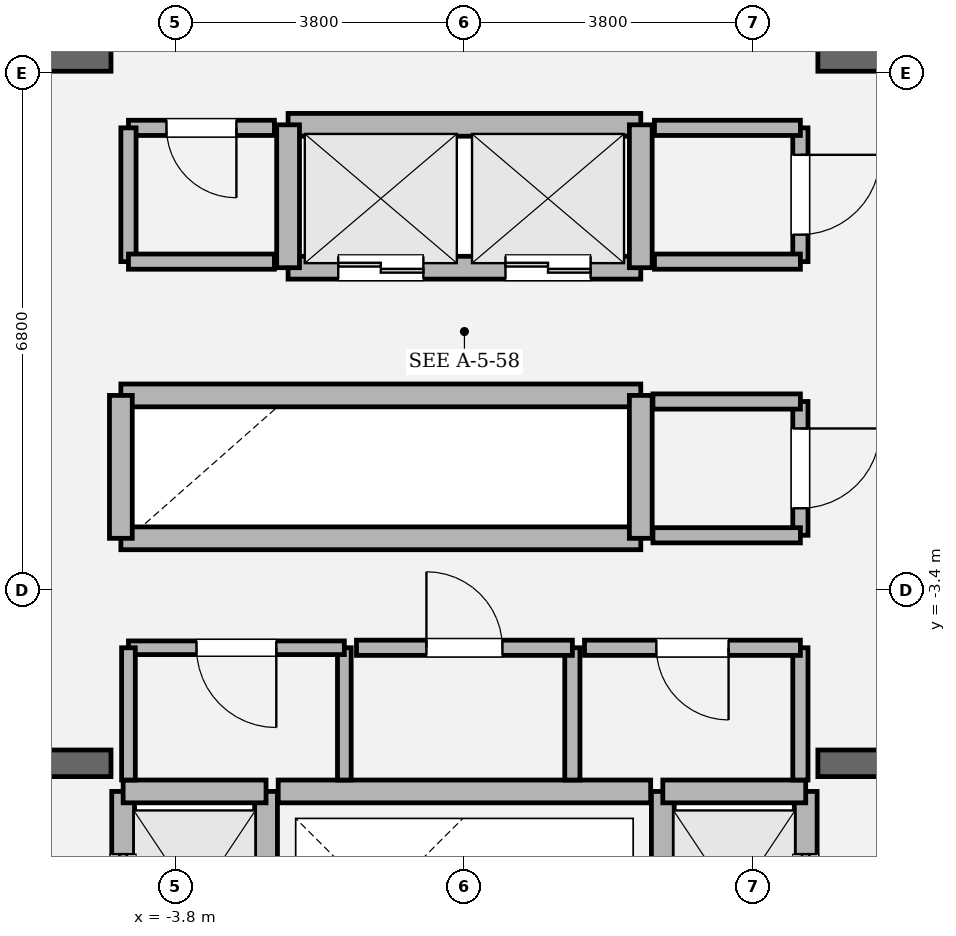
"""IFC4 building model, lengths in metres.
Left out: names, types, materials, properties, quantities, classifications, styles, units other than length and angle.
Written with IfcOpenShell. Run it as: python <this file> out.ifc"""

import sys

from ifc_helpers import new_model, si_unit, direction, frame, frame_2d, origin, place, context, subcontext, project, spatial, rectangle, extrude, element, fill, save


model = new_model("IFC4")
c1 = context("Model", 3, precision=1e-05, world=origin(), true_north=direction((0.0, 1.0)))
c2 = subcontext(c1, "Body", "Model", "MODEL_VIEW")
j1 = project(units=[si_unit("LENGTHUNIT", "METRE"), si_unit("PLANEANGLEUNIT", "RADIAN")], contexts=[c1])
p1 = place(None, origin())
s1 = spatial("IfcSite", under=j1, at=p1, CompositionType="ELEMENT")
p2 = place(p1, origin())
s2 = spatial("IfcBuilding", under=s1, at=p2, CompositionType="ELEMENT")
p3 = place(p2, frame((0.0, 0.0, 283.8)))
s3 = spatial("IfcBuildingStorey", under=s2, at=p3, CompositionType="ELEMENT", Elevation=283.8)
p4 = place(p3, frame((-9.925, -5.68, 0.0), z_axis=(0.0, 0.0, 1.0), x_axis=(1.0, 0.0, 0.0)))
e1 = element("IfcWall", 1, at=p4, inside=s3, PredefinedType="SOLIDWALL", context=c2, shape_type="SweptSolid", body=[
    extrude(rectangle(XDim=5.275, YDim=0.35, at=frame_2d((2.638, 0.0))), origin(), (0.0, 0.0, 1.0), 4.2),
])
p5 = place(p4, frame((1.385, 0.0, 0.0)))
e2 = element("IfcOpeningElement", 2, at=p5, cuts=e1, PredefinedType="OPENING", context=c2, shape_type="SweptSolid", body=[
    extrude(rectangle(XDim=1.18, YDim=2.2, at=frame_2d((0.59, 1.1))), frame((0.0, 0.185, 0.0), z_axis=(0.0, -1.0, 0.0), x_axis=(1.0, 0.0, 0.0)), (0.0, 0.0, 1.0), 0.37),
])
p6 = place(p3, frame((4.65, -5.68, 0.0), z_axis=(0.0, 0.0, 1.0), x_axis=(1.0, 0.0, 0.0)))
e3 = element("IfcWall", 3, at=p6, inside=s3, PredefinedType="SOLIDWALL", context=c2, shape_type="SweptSolid", body=[
    extrude(rectangle(XDim=5.275, YDim=0.35, at=frame_2d((2.638, 0.0))), origin(), (0.0, 0.0, 1.0), 4.2),
])
p7 = place(p6, frame((2.71, 0.0, 0.0)))
e4 = element("IfcOpeningElement", 4, at=p7, cuts=e3, PredefinedType="OPENING", context=c2, shape_type="SweptSolid", body=[
    extrude(rectangle(XDim=1.18, YDim=2.2, at=frame_2d((0.59, 1.1))), frame((0.0, 0.185, 0.0), z_axis=(0.0, -1.0, 0.0), x_axis=(1.0, 0.0, 0.0)), (0.0, 0.0, 1.0), 0.37),
])
for number, where, z_axis, x_axis in (
    (5, (-9.925, 3.6, 0.0), (0.0, 0.0, 1.0), (1.0, 0.0, 0.0)),
    (6, (4.65, 3.6, 0.0), (0.0, 0.0, 1.0), (1.0, 0.0, 0.0)),
):
    element("IfcWall", number, at=place(p3, frame(where, z_axis=z_axis, x_axis=x_axis)), inside=s3, PredefinedType="SOLIDWALL", context=c2, shape_type="SweptSolid", body=[
        extrude(rectangle(XDim=5.275, YDim=0.35, at=frame_2d((2.638, 0.0))), origin(), (0.0, 0.0, 1.0), 4.2),
    ])
p8 = place(p3, frame((-4.49, -8.82, 0.0), z_axis=(0.0, 0.0, 1.0), x_axis=(0.0, 1.0, 0.0)))
e7 = element("IfcWall", 7, at=p8, inside=s3, PredefinedType="SOLIDWALL", context=c2, shape_type="SweptSolid", body=[
    extrude(rectangle(XDim=2.77, YDim=0.3, at=frame_2d((1.385, 0.0))), origin(), (0.0, 0.0, 1.0), 4.0),
])
p9 = place(p8, frame((0.825, 0.0, 0.0)))
e8 = element("IfcOpeningElement", 8, at=p9, cuts=e7, PredefinedType="OPENING", context=c2, shape_type="SweptSolid", body=[
    extrude(rectangle(XDim=1.12, YDim=2.25, at=frame_2d((0.56, 1.125))), frame((0.0, 0.16, 0.0), z_axis=(0.0, -1.0, 0.0), x_axis=(1.0, 0.0, 0.0)), (0.0, 0.0, 1.0), 0.32),
])
p10 = place(p3, frame((-2.61, -8.82, 0.0), z_axis=(0.0, 0.0, 1.0), x_axis=(0.0, 1.0, 0.0)))
e9 = element("IfcWall", 9, at=p10, inside=s3, PredefinedType="SOLIDWALL", context=c2, shape_type="SweptSolid", body=[
    extrude(rectangle(XDim=2.77, YDim=0.3, at=frame_2d((1.385, 0.0))), origin(), (0.0, 0.0, 1.0), 4.0),
])
p11 = place(p3, frame((-4.49, -6.05, 0.0), z_axis=(0.0, 0.0, 1.0), x_axis=(1.0, 0.0, 0.0)))
e10 = element("IfcWall", 10, at=p11, inside=s3, PredefinedType="SOLIDWALL", context=c2, shape_type="SweptSolid", body=[
    extrude(rectangle(XDim=1.88, YDim=0.3, at=frame_2d((0.94, 0.0))), origin(), (0.0, 0.0, 1.0), 4.0),
])
p12 = place(p3, frame((4.49, -8.82, 0.0), z_axis=(0.0, 0.0, 1.0), x_axis=(0.0, 1.0, 0.0)))
e11 = element("IfcWall", 11, at=p12, inside=s3, PredefinedType="SOLIDWALL", context=c2, shape_type="SweptSolid", body=[
    extrude(rectangle(XDim=2.77, YDim=0.3, at=frame_2d((1.385, 0.0))), origin(), (0.0, 0.0, 1.0), 4.0),
])
p13 = place(p12, frame((0.825, 0.0, 0.0)))
e12 = element("IfcOpeningElement", 12, at=p13, cuts=e11, PredefinedType="OPENING", context=c2, shape_type="SweptSolid", body=[
    extrude(rectangle(XDim=1.12, YDim=2.25, at=frame_2d((0.56, 1.125))), frame((0.0, 0.16, 0.0), z_axis=(0.0, -1.0, 0.0), x_axis=(1.0, 0.0, 0.0)), (0.0, 0.0, 1.0), 0.32),
])
p14 = place(p3, frame((2.61, -8.82, 0.0), z_axis=(0.0, 0.0, 1.0), x_axis=(0.0, 1.0, 0.0)))
e13 = element("IfcWall", 13, at=p14, inside=s3, PredefinedType="SOLIDWALL", context=c2, shape_type="SweptSolid", body=[
    extrude(rectangle(XDim=2.77, YDim=0.3, at=frame_2d((1.385, 0.0))), origin(), (0.0, 0.0, 1.0), 4.0),
])
p15 = place(p3, frame((2.61, -6.05, 0.0), z_axis=(0.0, 0.0, 1.0), x_axis=(1.0, 0.0, 0.0)))
e14 = element("IfcWall", 14, at=p15, inside=s3, PredefinedType="SOLIDWALL", context=c2, shape_type="SweptSolid", body=[
    extrude(rectangle(XDim=1.88, YDim=0.3, at=frame_2d((0.94, 0.0))), origin(), (0.0, 0.0, 1.0), 4.0),
])
for number, where, z_axis, x_axis in (
    (15, (-4.52, -0.84, 0.0), (0.0, 0.0, 1.0), (1.0, 0.0, 0.0)),
    (16, (-4.52, -2.72, 0.0), (0.0, 0.0, 1.0), (1.0, 0.0, 0.0)),
):
    element("IfcWall", number, at=place(p3, frame(where, z_axis=z_axis, x_axis=x_axis)), inside=s3, PredefinedType="SOLIDWALL", context=c2, shape_type="SweptSolid", body=[
        extrude(rectangle(XDim=6.84, YDim=0.3, at=frame_2d((3.42, 0.0))), origin(), (0.0, 0.0, 1.0), 4.0),
    ])
for number, where, z_axis, x_axis in (
    (17, (-4.52, -2.72, 0.0), (0.0, 0.0, 1.0), (0.0, 1.0, 0.0)),
    (18, (2.32, -2.72, 0.0), (0.0, 0.0, 1.0), (0.0, 1.0, 0.0)),
):
    element("IfcWall", number, at=place(p3, frame(where, z_axis=z_axis, x_axis=x_axis)), inside=s3, PredefinedType="SOLIDWALL", context=c2, shape_type="SweptSolid", body=[
        extrude(rectangle(XDim=1.88, YDim=0.3, at=frame_2d((0.94, 0.0))), origin(), (0.0, 0.0, 1.0), 4.0),
    ])
p16 = place(p3, frame((-2.32, 0.84, 0.0), z_axis=(0.0, 0.0, 1.0), x_axis=(1.0, 0.0, 0.0)))
e19 = element("IfcWall", 19, at=p16, inside=s3, PredefinedType="SOLIDWALL", context=c2, shape_type="SweptSolid", body=[
    extrude(rectangle(XDim=4.64, YDim=0.3, at=frame_2d((2.32, 0.0))), origin(), (0.0, 0.0, 1.0), 4.0),
])
p17 = place(p16, frame((0.66, 0.0, 0.0)))
e20 = element("IfcOpeningElement", 20, at=p17, cuts=e19, PredefinedType="OPENING", context=c2, shape_type="SweptSolid", body=[
    extrude(rectangle(XDim=1.12, YDim=2.25, at=frame_2d((0.56, 1.125))), frame((0.0, 0.16, 0.0), z_axis=(0.0, -1.0, 0.0), x_axis=(1.0, 0.0, 0.0)), (0.0, 0.0, 1.0), 0.32),
])
p18 = place(p16, frame((2.86, 0.0, 0.0)))
e21 = element("IfcOpeningElement", 21, at=p18, cuts=e19, PredefinedType="OPENING", context=c2, shape_type="SweptSolid", body=[
    extrude(rectangle(XDim=1.12, YDim=2.25, at=frame_2d((0.56, 1.125))), frame((0.0, 0.16, 0.0), z_axis=(0.0, -1.0, 0.0), x_axis=(1.0, 0.0, 0.0)), (0.0, 0.0, 1.0), 0.32),
])
p19 = place(p3, frame((-2.32, 2.72, 0.0), z_axis=(0.0, 0.0, 1.0), x_axis=(1.0, 0.0, 0.0)))
e22 = element("IfcWall", 22, at=p19, inside=s3, PredefinedType="SOLIDWALL", context=c2, shape_type="SweptSolid", body=[
    extrude(rectangle(XDim=4.64, YDim=0.3, at=frame_2d((2.32, 0.0))), origin(), (0.0, 0.0, 1.0), 4.0),
])
for number, where, z_axis, x_axis in (
    (23, (-2.32, 0.84, 0.0), (0.0, 0.0, 1.0), (0.0, 1.0, 0.0)),
    (24, (2.32, 0.84, 0.0), (0.0, 0.0, 1.0), (0.0, 1.0, 0.0)),
):
    element("IfcWall", number, at=place(p3, frame(where, z_axis=z_axis, x_axis=x_axis)), inside=s3, PredefinedType="SOLIDWALL", context=c2, shape_type="SweptSolid", body=[
        extrude(rectangle(XDim=1.88, YDim=0.3, at=frame_2d((0.94, 0.0))), origin(), (0.0, 0.0, 1.0), 4.0),
    ])
p20 = place(p3, frame((-2.45, -6.05, 0.0), z_axis=(0.0, 0.0, 1.0), x_axis=(1.0, 0.0, 0.0)))
e25 = element("IfcWall", 25, at=p20, inside=s3, PredefinedType="SOLIDWALL", context=c2, shape_type="SweptSolid", body=[
    extrude(rectangle(XDim=4.9, YDim=0.3, at=frame_2d((2.45, 0.0))), origin(), (0.0, 0.0, 1.0), 4.0),
])
p21 = place(p3, frame((-1.58, -5.9, 0.0), z_axis=(0.0, 0.0, 1.0), x_axis=(0.0, 1.0, 0.0)))
e26 = element("IfcWall", 26, at=p21, inside=s3, PredefinedType="PARTITIONING", context=c2, shape_type="SweptSolid", body=[
    extrude(rectangle(XDim=1.74, YDim=0.18, at=frame_2d((0.87, 0.0))), origin(), (0.0, 0.0, 1.0), 4.0),
])
p22 = place(p3, frame((-1.58, -4.16, 0.0), z_axis=(0.0, 0.0, 1.0), x_axis=(-1.0, 0.0, 0.0)))
e27 = element("IfcWall", 27, at=p22, inside=s3, PredefinedType="PARTITIONING", context=c2, shape_type="SweptSolid", body=[
    extrude(rectangle(XDim=2.84, YDim=0.18, at=frame_2d((1.42, 0.0))), origin(), (0.0, 0.0, 1.0), 4.0),
])
p23 = place(p22, frame((0.895, 0.0, 0.0)))
e28 = element("IfcOpeningElement", 28, at=p23, cuts=e27, PredefinedType="OPENING", context=c2, shape_type="SweptSolid", body=[
    extrude(rectangle(XDim=1.05, YDim=2.2, at=frame_2d((0.525, 1.1))), frame((0.0, 0.1, 0.0), z_axis=(0.0, -1.0, 0.0), x_axis=(1.0, 0.0, 0.0)), (0.0, 0.0, 1.0), 0.2),
])
p24 = place(p3, frame((-4.42, -4.16, 0.0), z_axis=(0.0, 0.0, 1.0), x_axis=(0.0, -1.0, 0.0)))
e29 = element("IfcWall", 29, at=p24, inside=s3, PredefinedType="PARTITIONING", context=c2, shape_type="SweptSolid", body=[
    extrude(rectangle(XDim=1.74, YDim=0.18, at=frame_2d((0.87, 0.0))), origin(), (0.0, 0.0, 1.0), 4.0),
])
p25 = place(p3, frame((1.42, -5.9, 0.0), z_axis=(0.0, 0.0, 1.0), x_axis=(0.0, 1.0, 0.0)))
e30 = element("IfcWall", 30, at=p25, inside=s3, PredefinedType="SOLIDWALL", context=c2, shape_type="SweptSolid", body=[
    extrude(rectangle(XDim=1.74, YDim=0.2, at=frame_2d((0.87, 0.0))), origin(), (0.0, 0.0, 1.0), 4.0),
])
p26 = place(p3, frame((1.42, -4.16, 0.0), z_axis=(0.0, 0.0, 1.0), x_axis=(-1.0, 0.0, 0.0)))
e31 = element("IfcWall", 31, at=p26, inside=s3, PredefinedType="SOLIDWALL", context=c2, shape_type="SweptSolid", body=[
    extrude(rectangle(XDim=2.84, YDim=0.2, at=frame_2d((1.42, 0.0))), origin(), (0.0, 0.0, 1.0), 4.0),
])
p27 = place(p26, frame((0.92, 0.0, 0.0)))
e32 = element("IfcOpeningElement", 32, at=p27, cuts=e31, PredefinedType="OPENING", context=c2, shape_type="SweptSolid", body=[
    extrude(rectangle(XDim=1.0, YDim=2.15, at=frame_2d((0.5, 1.075))), frame((0.0, 0.11, 0.0), z_axis=(0.0, -1.0, 0.0), x_axis=(1.0, 0.0, 0.0)), (0.0, 0.0, 1.0), 0.22),
])
p28 = place(p3, frame((4.42, -5.9, 0.0), z_axis=(0.0, 0.0, 1.0), x_axis=(0.0, 1.0, 0.0)))
e33 = element("IfcWall", 33, at=p28, inside=s3, PredefinedType="SOLIDWALL", context=c2, shape_type="SweptSolid", body=[
    extrude(rectangle(XDim=1.74, YDim=0.2, at=frame_2d((0.87, 0.0))), origin(), (0.0, 0.0, 1.0), 4.0),
])
p29 = place(p3, frame((4.42, -4.16, 0.0), z_axis=(0.0, 0.0, 1.0), x_axis=(-1.0, 0.0, 0.0)))
e34 = element("IfcWall", 34, at=p29, inside=s3, PredefinedType="SOLIDWALL", context=c2, shape_type="SweptSolid", body=[
    extrude(rectangle(XDim=2.84, YDim=0.2, at=frame_2d((1.42, 0.0))), origin(), (0.0, 0.0, 1.0), 4.0),
])
p30 = place(p29, frame((0.945, 0.0, 0.0)))
e35 = element("IfcOpeningElement", 35, at=p30, cuts=e34, PredefinedType="OPENING", context=c2, shape_type="SweptSolid", body=[
    extrude(rectangle(XDim=0.95, YDim=2.15, at=frame_2d((0.475, 1.075))), frame((0.0, 0.11, 0.0), z_axis=(0.0, -1.0, 0.0), x_axis=(1.0, 0.0, 0.0)), (0.0, 0.0, 1.0), 0.22),
])
p31 = place(p3, frame((4.42, -2.68, 0.0), z_axis=(0.0, 0.0, 1.0), x_axis=(0.0, 1.0, 0.0)))
e36 = element("IfcWall", 36, at=p31, inside=s3, PredefinedType="SOLIDWALL", context=c2, shape_type="SweptSolid", body=[
    extrude(rectangle(XDim=1.76, YDim=0.2, at=frame_2d((0.88, 0.0))), origin(), (0.0, 0.0, 1.0), 4.0),
])
p32 = place(p31, frame((0.355, 0.0, 0.0)))
e37 = element("IfcOpeningElement", 37, at=p32, cuts=e36, PredefinedType="OPENING", context=c2, shape_type="SweptSolid", body=[
    extrude(rectangle(XDim=1.05, YDim=2.2, at=frame_2d((0.525, 1.1))), frame((0.0, 0.11, 0.0), z_axis=(0.0, -1.0, 0.0), x_axis=(1.0, 0.0, 0.0)), (0.0, 0.0, 1.0), 0.22),
])
for number, where, z_axis, x_axis in (
    (38, (4.42, -0.92, 0.0), (0.0, 0.0, 1.0), (-1.0, 0.0, 0.0)),
    (39, (2.48, -2.68, 0.0), (0.0, 0.0, 1.0), (1.0, 0.0, 0.0)),
):
    element("IfcWall", number, at=place(p3, frame(where, z_axis=z_axis, x_axis=x_axis)), inside=s3, PredefinedType="SOLIDWALL", context=c2, shape_type="SweptSolid", body=[
        extrude(rectangle(XDim=1.94, YDim=0.2, at=frame_2d((0.97, 0.0))), origin(), (0.0, 0.0, 1.0), 4.0),
    ])
p33 = place(p3, frame((-2.5, 2.68, 0.0), z_axis=(0.0, 0.0, 1.0), x_axis=(-1.0, 0.0, 0.0)))
e40 = element("IfcWall", 40, at=p33, inside=s3, PredefinedType="SOLIDWALL", context=c2, shape_type="SweptSolid", body=[
    extrude(rectangle(XDim=1.92, YDim=0.2, at=frame_2d((0.96, 0.0))), origin(), (0.0, 0.0, 1.0), 4.0),
])
p34 = place(p33, frame((0.5, 0.0, 0.0)))
e41 = element("IfcOpeningElement", 41, at=p34, cuts=e40, PredefinedType="OPENING", context=c2, shape_type="SweptSolid", body=[
    extrude(rectangle(XDim=0.92, YDim=2.1, at=frame_2d((0.46, 1.05))), frame((0.0, 0.11, 0.0), z_axis=(0.0, -1.0, 0.0), x_axis=(1.0, 0.0, 0.0)), (0.0, 0.0, 1.0), 0.22),
])
p35 = place(p3, frame((-4.42, 2.68, 0.0), z_axis=(0.0, 0.0, 1.0), x_axis=(0.0, -1.0, 0.0)))
e42 = element("IfcWall", 42, at=p35, inside=s3, PredefinedType="SOLIDWALL", context=c2, shape_type="SweptSolid", body=[
    extrude(rectangle(XDim=1.76, YDim=0.2, at=frame_2d((0.88, 0.0))), origin(), (0.0, 0.0, 1.0), 4.0),
])
p36 = place(p3, frame((-4.42, 0.92, 0.0), z_axis=(0.0, 0.0, 1.0), x_axis=(1.0, 0.0, 0.0)))
e43 = element("IfcWall", 43, at=p36, inside=s3, PredefinedType="SOLIDWALL", context=c2, shape_type="SweptSolid", body=[
    extrude(rectangle(XDim=1.92, YDim=0.2, at=frame_2d((0.96, 0.0))), origin(), (0.0, 0.0, 1.0), 4.0),
])
p37 = place(p3, frame((4.42, 0.92, 0.0), z_axis=(0.0, 0.0, 1.0), x_axis=(0.0, 1.0, 0.0)))
e44 = element("IfcWall", 44, at=p37, inside=s3, PredefinedType="SOLIDWALL", context=c2, shape_type="SweptSolid", body=[
    extrude(rectangle(XDim=1.76, YDim=0.2, at=frame_2d((0.88, 0.0))), origin(), (0.0, 0.0, 1.0), 4.0),
])
p38 = place(p37, frame((0.355, 0.0, 0.0)))
e45 = element("IfcOpeningElement", 45, at=p38, cuts=e44, PredefinedType="OPENING", context=c2, shape_type="SweptSolid", body=[
    extrude(rectangle(XDim=1.05, YDim=2.2, at=frame_2d((0.525, 1.1))), frame((0.0, 0.11, 0.0), z_axis=(0.0, -1.0, 0.0), x_axis=(1.0, 0.0, 0.0)), (0.0, 0.0, 1.0), 0.22),
])
for number, where, z_axis, x_axis in (
    (46, (4.42, 2.68, 0.0), (0.0, 0.0, 1.0), (-1.0, 0.0, 0.0)),
    (47, (2.5, 0.92, 0.0), (0.0, 0.0, 1.0), (1.0, 0.0, 0.0)),
):
    element("IfcWall", number, at=place(p3, frame(where, z_axis=z_axis, x_axis=x_axis)), inside=s3, PredefinedType="SOLIDWALL", context=c2, shape_type="SweptSolid", body=[
        extrude(rectangle(XDim=1.92, YDim=0.2, at=frame_2d((0.96, 0.0))), origin(), (0.0, 0.0, 1.0), 4.0),
    ])
p39 = place(p9, origin())
e48 = element("IfcDoor", 48, at=p39, inside=s3, OperationType="SLIDING_TO_LEFT", PredefinedType="DOOR", context=c2, shape_type="SweptSolid", body=[
    extrude(rectangle(XDim=1.12, YDim=2.25, at=frame_2d((0.56, 1.125))), frame((0.0, 0.025, 0.0), z_axis=(0.0, -1.0, 0.0), x_axis=(1.0, 0.0, 0.0)), (0.0, 0.0, 1.0), 0.05),
])
fill(e8, e48)
p40 = place(p13, origin())
e49 = element("IfcDoor", 49, at=p40, inside=s3, OperationType="SLIDING_TO_RIGHT", PredefinedType="DOOR", context=c2, shape_type="SweptSolid", body=[
    extrude(rectangle(XDim=1.12, YDim=2.25, at=frame_2d((0.56, 1.125))), frame((0.0, 0.025, 0.0), z_axis=(0.0, -1.0, 0.0), x_axis=(1.0, 0.0, 0.0)), (0.0, 0.0, 1.0), 0.05),
])
fill(e12, e49)
p41 = place(p17, origin())
e50 = element("IfcDoor", 50, at=p41, inside=s3, OperationType="DOUBLE_DOOR_SLIDING", PredefinedType="DOOR", context=c2, shape_type="SweptSolid", body=[
    extrude(rectangle(XDim=1.12, YDim=2.25, at=frame_2d((0.56, 1.125))), frame((0.0, 0.025, 0.0), z_axis=(0.0, -1.0, 0.0), x_axis=(1.0, 0.0, 0.0)), (0.0, 0.0, 1.0), 0.05),
])
fill(e20, e50)
p42 = place(p18, origin())
e51 = element("IfcDoor", 51, at=p42, inside=s3, OperationType="DOUBLE_DOOR_SLIDING", PredefinedType="DOOR", context=c2, shape_type="SweptSolid", body=[
    extrude(rectangle(XDim=1.12, YDim=2.25, at=frame_2d((0.56, 1.125))), frame((0.0, 0.025, 0.0), z_axis=(0.0, -1.0, 0.0), x_axis=(1.0, 0.0, 0.0)), (0.0, 0.0, 1.0), 0.05),
])
fill(e21, e51)
p43 = place(p23, origin())
e52 = element("IfcDoor", 52, at=p43, inside=s3, OperationType="SINGLE_SWING_LEFT", PredefinedType="DOOR", context=c2, shape_type="SweptSolid", body=[
    extrude(rectangle(XDim=1.05, YDim=2.2, at=frame_2d((0.525, 1.1))), frame((0.0, 0.025, 0.0), z_axis=(0.0, -1.0, 0.0), x_axis=(1.0, 0.0, 0.0)), (0.0, 0.0, 1.0), 0.05),
])
fill(e28, e52)
p44 = place(p27, origin())
e53 = element("IfcDoor", 53, at=p44, inside=s3, OperationType="SINGLE_SWING_RIGHT", PredefinedType="DOOR", context=c2, shape_type="SweptSolid", body=[
    extrude(rectangle(XDim=1.0, YDim=2.15, at=frame_2d((0.5, 1.075))), frame((0.0, 0.025, 0.0), z_axis=(0.0, -1.0, 0.0), x_axis=(1.0, 0.0, 0.0)), (0.0, 0.0, 1.0), 0.05),
])
fill(e32, e53)
p45 = place(p30, origin())
e54 = element("IfcDoor", 54, at=p45, inside=s3, OperationType="SINGLE_SWING_LEFT", PredefinedType="DOOR", context=c2, shape_type="SweptSolid", body=[
    extrude(rectangle(XDim=0.95, YDim=2.15, at=frame_2d((0.475, 1.075))), frame((0.0, 0.025, 0.0), z_axis=(0.0, -1.0, 0.0), x_axis=(1.0, 0.0, 0.0)), (0.0, 0.0, 1.0), 0.05),
])
fill(e35, e54)
p46 = place(p32, origin())
e55 = element("IfcDoor", 55, at=p46, inside=s3, OperationType="SINGLE_SWING_RIGHT", PredefinedType="DOOR", context=c2, shape_type="SweptSolid", body=[
    extrude(rectangle(XDim=1.05, YDim=2.2, at=frame_2d((0.525, 1.1))), frame((0.0, 0.025, 0.0), z_axis=(0.0, -1.0, 0.0), x_axis=(1.0, 0.0, 0.0)), (0.0, 0.0, 1.0), 0.05),
])
fill(e37, e55)
p47 = place(p34, origin())
e56 = element("IfcDoor", 56, at=p47, inside=s3, OperationType="SINGLE_SWING_LEFT", PredefinedType="DOOR", context=c2, shape_type="SweptSolid", body=[
    extrude(rectangle(XDim=0.92, YDim=2.1, at=frame_2d((0.46, 1.05))), frame((0.0, 0.025, 0.0), z_axis=(0.0, -1.0, 0.0), x_axis=(1.0, 0.0, 0.0)), (0.0, 0.0, 1.0), 0.05),
])
fill(e41, e56)
p48 = place(p38, origin())
e57 = element("IfcDoor", 57, at=p48, inside=s3, OperationType="SINGLE_SWING_RIGHT", PredefinedType="DOOR", context=c2, shape_type="SweptSolid", body=[
    extrude(rectangle(XDim=1.05, YDim=2.2, at=frame_2d((0.525, 1.1))), frame((0.0, 0.025, 0.0), z_axis=(0.0, -1.0, 0.0), x_axis=(1.0, 0.0, 0.0)), (0.0, 0.0, 1.0), 0.05),
])
fill(e45, e57)
save(model, sys.argv[1])
